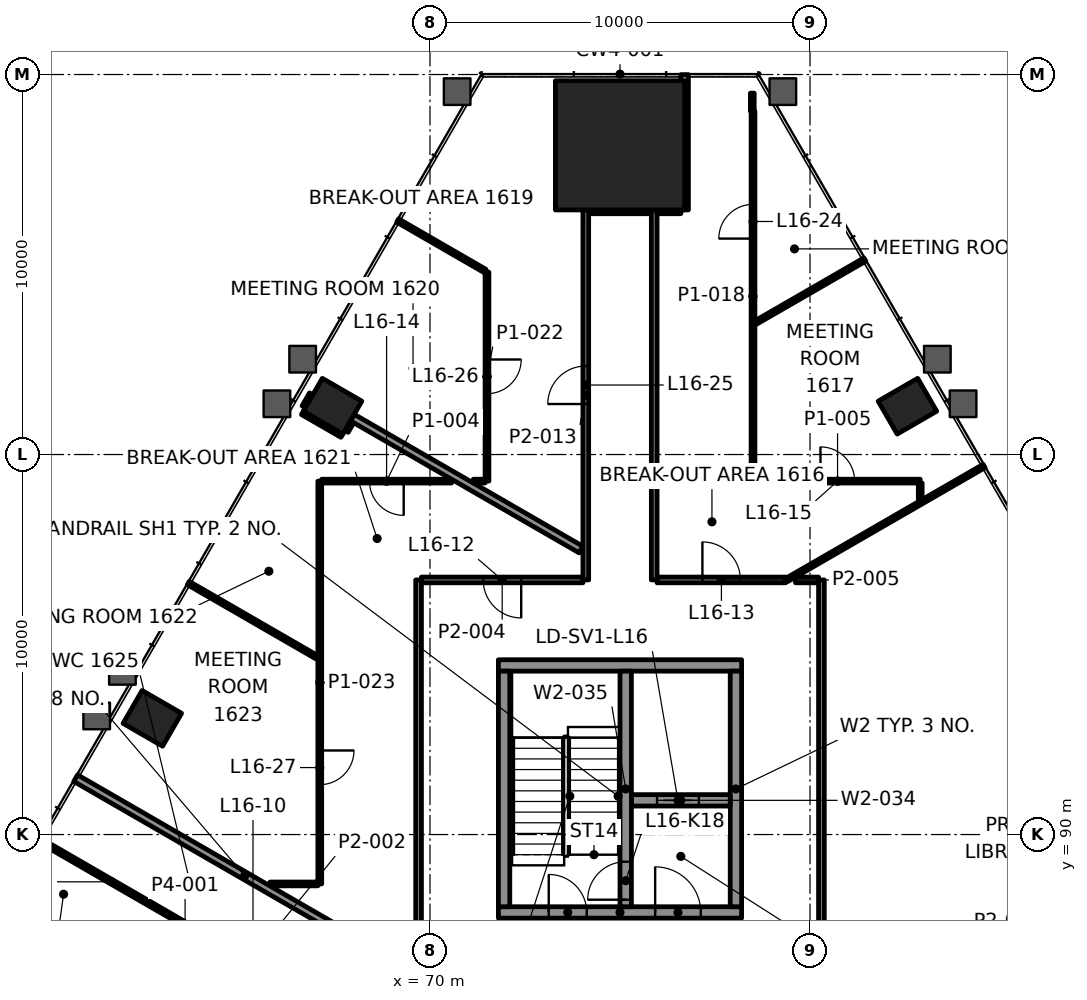
"""IFC4 building model, lengths in metres.
Left out: names, types, materials, properties, quantities, classifications, styles, units other than length and angle.
Written with IfcOpenShell. Run it as: python <this file> out.ifc"""

import sys

from ifc_helpers import new_model, si_unit, direction, frame, frame_2d, origin, origin_2d, place, context, subcontext, project, spatial, rectangle, extrude, element, fill, save


model = new_model("IFC4")
c1 = context("Model", 3, precision=1e-05, world=origin(), true_north=direction((0.0, 1.0)))
c2 = subcontext(c1, "Body", "Model", "MODEL_VIEW")
j1 = project(units=[si_unit("LENGTHUNIT", "METRE"), si_unit("PLANEANGLEUNIT", "RADIAN")], contexts=[c1])
p1 = place(None, origin())
s1 = spatial("IfcSite", under=j1, at=p1, CompositionType="ELEMENT")
p2 = place(p1, origin())
s2 = spatial("IfcBuilding", under=s1, at=p2, CompositionType="ELEMENT")
p3 = place(p2, frame((0.0, 0.0, 73.6)))
s3 = spatial("IfcBuildingStorey", under=s2, at=p3, CompositionType="ELEMENT", Elevation=73.6)
p4 = place(p3, frame((75.0, 108.136, 0.0), z_axis=(0.0, 0.0, 1.0), x_axis=(-1.0, 0.0, 0.0)))
e1 = element("IfcColumn", 1, at=p4, inside=s3, PredefinedType="COLUMN", context=c2, shape_type="SweptSolid", body=[
    extrude(rectangle(XDim=3.4, YDim=3.4, at=origin_2d()), origin(), (0.0, 0.0, 1.0), 4.2),
])
for number, where, z_axis, x_axis in (
    (2, (82.563, 101.272, -0.0), (0.0, 0.0, 1.0), (-0.5, 0.866, 0.0)),
    (3, (67.437, 101.272, -0.0), (0.0, 0.0, 1.0), (-0.5, -0.866, 0.0)),
    (4, (62.694, 93.057, -0.0), (0.0, 0.0, 1.0), (-0.5, -0.866, 0.0)),
):
    element("IfcColumn", number, at=place(p3, frame(where, z_axis=z_axis, x_axis=x_axis)), inside=s3, PredefinedType="COLUMN", context=c2, shape_type="SweptSolid", body=[
        extrude(rectangle(XDim=1.0, YDim=1.2, at=origin_2d()), origin(), (0.0, 0.0, 1.0), 4.2),
    ])
p5 = place(p3, frame((71.8, 87.95, 0.0), z_axis=(0.0, 0.0, 1.0), x_axis=(1.0, 0.0, 0.0)))
e5 = element("IfcWall", 5, at=p5, inside=s3, PredefinedType="SHEAR", context=c2, shape_type="SweptSolid", body=[
    extrude(rectangle(XDim=6.4, YDim=0.3, at=frame_2d((3.2, 0.0))), origin(), (0.0, 0.0, 1.0), 4.0),
])
p6 = place(p5, frame((1.325, 0.0, 0.0)))
e6 = element("IfcOpeningElement", 6, at=p6, cuts=e5, PredefinedType="OPENING", context=c2, shape_type="SweptSolid", body=[
    extrude(rectangle(XDim=1.0, YDim=2.1, at=frame_2d((0.5, 1.05))), frame((0.0, 0.16, 0.0), z_axis=(0.0, -1.0, 0.0), x_axis=(1.0, 0.0, 0.0)), (0.0, 0.0, 1.0), 0.32),
])
p7 = place(p5, frame((4.125, 0.0, 0.0)))
e7 = element("IfcOpeningElement", 7, at=p7, cuts=e5, PredefinedType="OPENING", context=c2, shape_type="SweptSolid", body=[
    extrude(rectangle(XDim=1.2, YDim=2.1, at=frame_2d((0.6, 1.05))), frame((0.0, 0.16, 0.0), z_axis=(0.0, -1.0, 0.0), x_axis=(1.0, 0.0, 0.0)), (0.0, 0.0, 1.0), 0.32),
])
p8 = place(p3, frame((71.8, 94.45, 0.0), z_axis=(0.0, 0.0, 1.0), x_axis=(1.0, 0.0, 0.0)))
e8 = element("IfcWall", 8, at=p8, inside=s3, PredefinedType="SHEAR", context=c2, shape_type="SweptSolid", body=[
    extrude(rectangle(XDim=6.4, YDim=0.3, at=frame_2d((3.2, 0.0))), origin(), (0.0, 0.0, 1.0), 4.0),
])
for number, where, z_axis, x_axis in (
    (9, (71.95, 88.1, 0.0), (0.0, 0.0, 1.0), (0.0, 1.0, 0.0)),
    (10, (78.05, 88.1, 0.0), (0.0, 0.0, 1.0), (0.0, 1.0, 0.0)),
):
    element("IfcWall", number, at=place(p3, frame(where, z_axis=z_axis, x_axis=x_axis)), inside=s3, PredefinedType="SHEAR", context=c2, shape_type="SweptSolid", body=[
        extrude(rectangle(XDim=6.2, YDim=0.3, at=frame_2d((3.1, 0.0))), origin(), (0.0, 0.0, 1.0), 4.0),
    ])
p9 = place(p3, frame((75.3, 90.9, 0.0), z_axis=(0.0, 0.0, 1.0), x_axis=(1.0, 0.0, 0.0)))
e11 = element("IfcWall", 11, at=p9, inside=s3, PredefinedType="SHEAR", context=c2, shape_type="SweptSolid", body=[
    extrude(rectangle(XDim=2.6, YDim=0.3, at=frame_2d((1.3, 0.0))), origin(), (0.0, 0.0, 1.0), 4.0),
])
p10 = place(p9, frame((0.675, 0.0, 0.0)))
e12 = element("IfcOpeningElement", 12, at=p10, cuts=e11, PredefinedType="OPENING", context=c2, shape_type="SweptSolid", body=[
    extrude(rectangle(XDim=1.1, YDim=2.1, at=frame_2d((0.55, 1.05))), frame((0.0, 0.16, 0.0), z_axis=(0.0, -1.0, 0.0), x_axis=(1.0, 0.0, 0.0)), (0.0, 0.0, 1.0), 0.32),
])
p11 = place(p3, frame((75.15, 88.1, 0.0), z_axis=(0.0, 0.0, 1.0), x_axis=(0.0, 1.0, 0.0)))
e13 = element("IfcWall", 13, at=p11, inside=s3, PredefinedType="SHEAR", context=c2, shape_type="SweptSolid", body=[
    extrude(rectangle(XDim=6.2, YDim=0.3, at=frame_2d((3.1, 0.0))), origin(), (0.0, 0.0, 1.0), 4.0),
])
p12 = place(p11, frame((0.185, 0.0, 0.0)))
e14 = element("IfcOpeningElement", 14, at=p12, cuts=e13, PredefinedType="OPENING", context=c2, shape_type="SweptSolid", body=[
    extrude(rectangle(XDim=1.0, YDim=2.1, at=frame_2d((0.5, 1.05))), frame((0.0, 0.16, 0.0), z_axis=(0.0, -1.0, 0.0), x_axis=(1.0, 0.0, 0.0)), (0.0, 0.0, 1.0), 0.32),
])
p13 = place(p3, frame((65.789, 88.7, 0.0), z_axis=(0.0, 0.0, 1.0), x_axis=(1.0, 0.0, 0.0)))
e15 = element("IfcWall", 15, at=p13, inside=s3, PredefinedType="PARTITIONING", context=c2, shape_type="SweptSolid", body=[
    extrude(rectangle(XDim=1.261, YDim=0.1, at=frame_2d((0.631, 0.0))), origin(), (0.0, 0.0, 1.0), 3.4),
])
p14 = place(p3, frame((74.025, 96.7, 0.0), z_axis=(0.0, 0.0, 1.0), x_axis=(-1.0, 0.0, 0.0)))
e16 = element("IfcWall", 16, at=p14, inside=s3, PredefinedType="PARTITIONING", context=c2, shape_type="SweptSolid", body=[
    extrude(rectangle(XDim=4.25, YDim=0.15, at=frame_2d((2.125, 0.0))), origin(), (0.0, 0.0, 1.0), 3.4),
])
p15 = place(p14, frame((1.625, 0.0, 0.0)))
e17 = element("IfcOpeningElement", 17, at=p15, cuts=e16, PredefinedType="OPENING", context=c2, shape_type="SweptSolid", body=[
    extrude(rectangle(XDim=1.0, YDim=2.1, at=frame_2d((0.5, 1.05))), frame((0.0, 0.085, 0.0), z_axis=(0.0, -1.0, 0.0), x_axis=(1.0, 0.0, 0.0)), (0.0, 0.0, 1.0), 0.17),
])
p16 = place(p3, frame((75.975, 96.7, 0.0), z_axis=(0.0, 0.0, 1.0), x_axis=(1.0, 0.0, 0.0)))
e18 = element("IfcWall", 18, at=p16, inside=s3, PredefinedType="PARTITIONING", context=c2, shape_type="SweptSolid", body=[
    extrude(rectangle(XDim=3.387, YDim=0.15, at=frame_2d((1.693, 0.0))), origin(), (0.0, 0.0, 1.0), 3.4),
])
p17 = place(p16, frame((1.194, 0.0, 0.0)))
e19 = element("IfcOpeningElement", 19, at=p17, cuts=e18, PredefinedType="OPENING", context=c2, shape_type="SweptSolid", body=[
    extrude(rectangle(XDim=1.0, YDim=2.1, at=frame_2d((0.5, 1.05))), frame((0.0, 0.085, 0.0), z_axis=(0.0, -1.0, 0.0), x_axis=(1.0, 0.0, 0.0)), (0.0, 0.0, 1.0), 0.17),
])
p18 = place(p3, frame((70.567, 99.3, 0.0), z_axis=(0.0, 0.0, 1.0), x_axis=(-1.0, 0.0, 0.0)))
e20 = element("IfcWall", 20, at=p18, inside=s3, PredefinedType="PARTITIONING", context=c2, shape_type="SweptSolid", body=[
    extrude(rectangle(XDim=3.417, YDim=0.1, at=frame_2d((1.708, 0.0))), origin(), (0.0, 0.0, 1.0), 3.4),
])
p19 = place(p18, frame((1.258, 0.0, 0.0)))
e21 = element("IfcOpeningElement", 21, at=p19, cuts=e20, PredefinedType="OPENING", context=c2, shape_type="SweptSolid", body=[
    extrude(rectangle(XDim=0.9, YDim=2.1, at=frame_2d((0.45, 1.05))), frame((0.0, 0.06, 0.0), z_axis=(0.0, -1.0, 0.0), x_axis=(1.0, 0.0, 0.0)), (0.0, 0.0, 1.0), 0.12),
])
p20 = place(p3, frame((78.55, 99.3, 0.0), z_axis=(0.0, 0.0, 1.0), x_axis=(1.0, 0.0, 0.0)))
e22 = element("IfcWall", 22, at=p20, inside=s3, PredefinedType="PARTITIONING", context=c2, shape_type="SweptSolid", body=[
    extrude(rectangle(XDim=4.349, YDim=0.1, at=frame_2d((2.175, 0.0))), origin(), (0.0, 0.0, 1.0), 3.4),
])
p21 = place(p20, frame((1.725, 0.0, 0.0)))
e23 = element("IfcOpeningElement", 23, at=p21, cuts=e22, PredefinedType="OPENING", context=c2, shape_type="SweptSolid", body=[
    extrude(rectangle(XDim=0.9, YDim=2.1, at=frame_2d((0.45, 1.05))), frame((0.0, 0.06, 0.0), z_axis=(0.0, -1.0, 0.0), x_axis=(1.0, 0.0, 0.0)), (0.0, 0.0, 1.0), 0.12),
])
p22 = place(p3, frame((74.176, 106.437, 0.0), z_axis=(0.0, 0.0, 1.0), x_axis=(1.0, 0.0, 0.0)))
e24 = element("IfcWall", 24, at=p22, inside=s3, PredefinedType="PARTITIONING", context=c2, shape_type="SweptSolid", body=[
    extrude(rectangle(XDim=1.649, YDim=0.2, at=frame_2d((0.825, 0.0))), origin(), (0.0, 0.0, 1.0), 3.397),
])
p23 = place(p3, frame((79.387, 96.7, 0.0), z_axis=(0.0, 0.0, 1.0), x_axis=(0.866032365835, 0.499987941182, 0.0)))
e25 = element("IfcWall", 25, at=p23, inside=s3, PredefinedType="PARTITIONING", context=c2, shape_type="SweptSolid", body=[
    extrude(rectangle(XDim=5.997, YDim=0.1, at=frame_2d((2.999, 0.0))), origin(), (0.0, 0.0, 1.0), 3.165),
])
p24 = place(p3, frame((78.576, 103.476, 0.0), z_axis=(0.0, 0.0, 1.0), x_axis=(0.866043162687, 0.499969239416, 0.0)))
e26 = element("IfcWall", 26, at=p24, inside=s3, PredefinedType="PARTITIONING", context=c2, shape_type="SweptSolid", body=[
    extrude(rectangle(XDim=3.311, YDim=0.1, at=frame_2d((1.656, 0.0))), origin(), (0.0, 0.0, 1.0), 3.4),
])
p25 = place(p3, frame((67.761, 100.634, 0.0), z_axis=(0.0, 0.0, 1.0), x_axis=(0.500305662732, 0.865848857387, 0.0)))
e27 = element("IfcWall", 27, at=p25, inside=s3, PredefinedType="PARTITIONING", context=c2, shape_type="SweptSolid", body=[
    extrude(rectangle(XDim=0.29, YDim=0.2, at=frame_2d((0.145, 0.0))), origin(), (0.0, 0.0, 1.0), 3.4),
])
p26 = place(p3, frame((66.721, 101.232, 0.0), z_axis=(0.0, 0.0, 1.0), x_axis=(0.500080938595, 0.865978668822, 0.0)))
e28 = element("IfcWall", 28, at=p26, inside=s3, PredefinedType="PARTITIONING", context=c2, shape_type="SweptSolid", body=[
    extrude(rectangle(XDim=0.393, YDim=0.2, at=frame_2d((0.197, 0.0))), origin(), (0.0, 0.0, 1.0), 3.4),
])
p27 = place(p3, frame((82.9, 98.816, 0.0), z_axis=(0.0, 0.0, 1.0), x_axis=(0.0, 1.0, 0.0)))
e29 = element("IfcWall", 29, at=p27, inside=s3, PredefinedType="PARTITIONING", context=c2, shape_type="SweptSolid", body=[
    extrude(rectangle(XDim=0.433, YDim=0.1, at=frame_2d((0.217, 0.0))), origin(), (0.0, 0.0, 1.0), 3.4),
])
p28 = place(p3, frame((80.3, 86.1, 0.0), z_axis=(0.0, 0.0, 1.0), x_axis=(0.0, 1.0, 0.0)))
e30 = element("IfcWall", 30, at=p28, inside=s3, PredefinedType="PARTITIONING", context=c2, shape_type="SweptSolid", body=[
    extrude(rectangle(XDim=10.599, YDim=0.15, at=frame_2d((5.3, 0.0))), origin(), (0.0, 0.0, 1.0), 3.4),
])
p29 = place(p3, frame((78.5, 99.3, 0.0), z_axis=(0.0, 0.0, 1.0), x_axis=(0.0, 1.0, 0.0)))
e31 = element("IfcWall", 31, at=p29, inside=s3, PredefinedType="PARTITIONING", context=c2, shape_type="SweptSolid", body=[
    extrude(rectangle(XDim=9.736, YDim=0.1, at=frame_2d((4.868, 0.0))), origin(), (0.0, 0.0, 1.0), 3.4),
])
p30 = place(p29, frame((6.382, 0.0, 0.0)))
e32 = element("IfcOpeningElement", 32, at=p30, cuts=e31, PredefinedType="OPENING", context=c2, shape_type="SweptSolid", body=[
    extrude(rectangle(XDim=0.9, YDim=2.1, at=frame_2d((0.45, 1.05))), frame((0.0, 0.06, 0.0), z_axis=(0.0, -1.0, 0.0), x_axis=(1.0, 0.0, 0.0)), (0.0, 0.0, 1.0), 0.12),
])
p31 = place(p3, frame((78.481, 109.037, 0.0), z_axis=(0.0, 0.0, 1.0), x_axis=(0.0, 1.0, 0.0)))
e33 = element("IfcWall", 33, at=p31, inside=s3, PredefinedType="PARTITIONING", context=c2, shape_type="SweptSolid", body=[
    extrude(rectangle(XDim=0.473, YDim=0.1, at=frame_2d((0.237, 0.0))), origin(), (0.0, 0.0, 1.0), 3.4),
])
p32 = place(p3, frame((76.7, 106.437, 0.0), z_axis=(0.0, 0.0, 1.0), x_axis=(0.0, 1.0, 0.0)))
e34 = element("IfcWall", 34, at=p32, inside=s3, PredefinedType="PARTITIONING", context=c2, shape_type="SweptSolid", body=[
    extrude(rectangle(XDim=3.56, YDim=0.2, at=frame_2d((1.78, 0.0))), origin(), (0.0, 0.0, 1.0), 3.4),
])
p33 = place(p3, frame((75.9, 96.7, 0.0), z_axis=(0.0, 0.0, 1.0), x_axis=(0.0, 1.0, 0.0)))
e35 = element("IfcWall", 35, at=p33, inside=s3, PredefinedType="PARTITIONING", context=c2, shape_type="SweptSolid", body=[
    extrude(rectangle(XDim=9.737, YDim=0.15, at=frame_2d((4.868, 0.0))), origin(), (0.0, 0.0, 1.0), 3.4),
])
p34 = place(p3, frame((74.1, 96.7, 0.0), z_axis=(0.0, 0.0, 1.0), x_axis=(0.0, 1.0, 0.0)))
e36 = element("IfcWall", 36, at=p34, inside=s3, PredefinedType="PARTITIONING", context=c2, shape_type="SweptSolid", body=[
    extrude(rectangle(XDim=9.736, YDim=0.15, at=frame_2d((4.868, 0.0))), origin(), (0.0, 0.0, 1.0), 3.4),
])
p35 = place(p34, frame((4.629, 0.0, 0.0)))
e37 = element("IfcOpeningElement", 37, at=p35, cuts=e36, PredefinedType="OPENING", context=c2, shape_type="SweptSolid", body=[
    extrude(rectangle(XDim=1.0, YDim=2.1, at=frame_2d((0.5, 1.05))), frame((0.0, 0.085, 0.0), z_axis=(0.0, -1.0, 0.0), x_axis=(1.0, 0.0, 0.0)), (0.0, 0.0, 1.0), 0.17),
])
p36 = place(p3, frame((71.5, 104.801, 0.0), z_axis=(0.0, 0.0, 1.0), x_axis=(0.0, -1.0, 0.0)))
e38 = element("IfcWall", 38, at=p36, inside=s3, PredefinedType="PARTITIONING", context=c2, shape_type="SweptSolid", body=[
    extrude(rectangle(XDim=5.501, YDim=0.1, at=frame_2d((2.75, 0.0))), origin(), (0.0, 0.0, 1.0), 3.4),
])
p37 = place(p36, frame((2.301, 0.0, 0.0)))
e39 = element("IfcOpeningElement", 39, at=p37, cuts=e38, PredefinedType="OPENING", context=c2, shape_type="SweptSolid", body=[
    extrude(rectangle(XDim=0.9, YDim=2.1, at=frame_2d((0.45, 1.05))), frame((0.0, 0.06, 0.0), z_axis=(0.0, -1.0, 0.0), x_axis=(1.0, 0.0, 0.0)), (0.0, 0.0, 1.0), 0.12),
])
p38 = place(p3, frame((69.7, 86.1, 0.0), z_axis=(0.0, 0.0, 1.0), x_axis=(0.0, 1.0, 0.0)))
e40 = element("IfcWall", 40, at=p38, inside=s3, PredefinedType="PARTITIONING", context=c2, shape_type="SweptSolid", body=[
    extrude(rectangle(XDim=10.6, YDim=0.15, at=frame_2d((5.3, 0.0))), origin(), (0.0, 0.0, 1.0), 3.4),
])
p39 = place(p3, frame((67.1, 99.3, 0.0), z_axis=(0.0, 0.0, 1.0), x_axis=(0.0, -1.0, 0.0)))
e41 = element("IfcWall", 41, at=p39, inside=s3, PredefinedType="PARTITIONING", context=c2, shape_type="SweptSolid", body=[
    extrude(rectangle(XDim=10.6, YDim=0.1, at=frame_2d((5.3, 0.0))), origin(), (0.0, 0.0, 1.0), 3.4),
])
p40 = place(p39, frame((7.088, 0.0, 0.0)))
e42 = element("IfcOpeningElement", 42, at=p40, cuts=e41, PredefinedType="OPENING", context=c2, shape_type="SweptSolid", body=[
    extrude(rectangle(XDim=0.9, YDim=2.1, at=frame_2d((0.45, 1.05))), frame((0.0, 0.06, 0.0), z_axis=(0.0, -1.0, 0.0), x_axis=(1.0, 0.0, 0.0)), (0.0, 0.0, 1.0), 0.12),
])
p41 = place(p3, frame((71.45, 104.83, 0.0), z_axis=(0.0, 0.0, 1.0), x_axis=(-0.866023371876, 0.500003519352, 0.0)))
e43 = element("IfcWall", 43, at=p41, inside=s3, PredefinedType="PARTITIONING", context=c2, shape_type="SweptSolid", body=[
    extrude(rectangle(XDim=2.657, YDim=0.1, at=frame_2d((1.328, 0.0))), origin(), (0.0, 0.0, 1.0), 3.4),
])
p42 = place(p3, frame((73.973, 97.499, 0.0), z_axis=(0.0, 0.0, 1.0), x_axis=(-0.866037536751, 0.499978984496, 0.0)))
e44 = element("IfcWall", 44, at=p42, inside=s3, PredefinedType="PARTITIONING", context=c2, shape_type="SweptSolid", body=[
    extrude(rectangle(XDim=6.948, YDim=0.2, at=frame_2d((3.474, 0.0))), origin(), (0.0, 0.0, 1.0), 3.4),
])
p43 = place(p3, frame((67.707, 100.539, 0.0), z_axis=(0.0, 0.0, 1.0), x_axis=(-0.865955154139, 0.50012165622, 0.0)))
e45 = element("IfcWall", 45, at=p43, inside=s3, PredefinedType="PARTITIONING", context=c2, shape_type="SweptSolid", body=[
    extrude(rectangle(XDim=1.2, YDim=0.2, at=frame_2d((0.6, 0.0))), origin(), (0.0, 0.0, 1.0), 3.165),
])
p44 = place(p3, frame((67.024, 94.665, 0.0), z_axis=(0.0, 0.0, 1.0), x_axis=(-0.866046116492, 0.499964122822, 0.0)))
e46 = element("IfcWall", 46, at=p44, inside=s3, PredefinedType="PARTITIONING", context=c2, shape_type="SweptSolid", body=[
    extrude(rectangle(XDim=3.906, YDim=0.1, at=frame_2d((1.953, 0.0))), origin(), (0.0, 0.0, 1.0), 3.165),
])
p45 = place(p3, frame((69.573, 86.348, 0.0), z_axis=(0.0, 0.0, 1.0), x_axis=(-0.866024495625, 0.500001572974, 0.0)))
e47 = element("IfcWall", 47, at=p45, inside=s3, PredefinedType="PARTITIONING", context=c2, shape_type="SweptSolid", body=[
    extrude(rectangle(XDim=10.272, YDim=0.2, at=frame_2d((5.136, 0.0))), origin(), (0.0, 0.0, 1.0), 3.165),
])
p46 = place(p3, frame((63.512, 87.665, 0.0), z_axis=(0.0, 0.0, 1.0), x_axis=(-0.866014185868, 0.500019429497, 0.0)))
e48 = element("IfcWall", 48, at=p46, inside=s3, PredefinedType="PARTITIONING", context=c2, shape_type="SweptSolid", body=[
    extrude(rectangle(XDim=4.365, YDim=0.12, at=frame_2d((2.182, 0.0))), origin(), (0.0, 0.0, 1.0), 3.165),
])
p47 = place(p3, frame((79.617, 96.7, 0.0), z_axis=(0.0, 0.0, 1.0), x_axis=(1.0, 0.0, 0.0)))
e49 = element("IfcWall", 49, at=p47, inside=s3, PredefinedType="PARTITIONING", context=c2, shape_type="SweptSolid", body=[
    extrude(rectangle(XDim=0.607, YDim=0.15, at=frame_2d((0.304, 0.0))), origin(), (0.0, 0.0, 1.0), 3.4),
])
p48 = place(p3, frame((71.14, 99.3, 0.0), z_axis=(0.0, 0.0, 1.0), x_axis=(1.0, 0.0, 0.0)))
e50 = element("IfcWall", 50, at=p48, inside=s3, PredefinedType="PARTITIONING", context=c2, shape_type="SweptSolid", body=[
    extrude(rectangle(XDim=0.31, YDim=0.1, at=frame_2d((0.155, 0.0))), origin(), (0.0, 0.0, 1.0), 3.4),
])
p49 = place(p3, frame((75.975, 106.437, 0.0), z_axis=(0.0, 0.0, 1.0), x_axis=(1.0, 0.0, 0.0)))
e51 = element("IfcWall", 51, at=p49, inside=s3, PredefinedType="PARTITIONING", context=c2, shape_type="SweptSolid", body=[
    extrude(rectangle(XDim=0.625, YDim=0.2, at=frame_2d((0.312, 0.0))), origin(), (0.0, 0.0, 1.0), 3.4),
])
p50 = place(p15, origin())
e52 = element("IfcDoor", 52, at=p50, inside=s3, OperationType="SINGLE_SWING_LEFT", PredefinedType="DOOR", context=c2, shape_type="SweptSolid", body=[
    extrude(rectangle(XDim=1.0, YDim=2.1, at=frame_2d((0.5, 1.05))), frame((0.0, 0.025, 0.0), z_axis=(0.0, -1.0, 0.0), x_axis=(1.0, 0.0, 0.0)), (0.0, 0.0, 1.0), 0.05),
])
fill(e17, e52)
p51 = place(p17, origin())
e53 = element("IfcDoor", 53, at=p51, inside=s3, OperationType="SINGLE_SWING_LEFT", PredefinedType="DOOR", context=c2, shape_type="SweptSolid", body=[
    extrude(rectangle(XDim=1.0, YDim=2.1, at=frame_2d((0.5, 1.05))), frame((0.0, 0.025, 0.0), z_axis=(0.0, -1.0, 0.0), x_axis=(1.0, 0.0, 0.0)), (0.0, 0.0, 1.0), 0.05),
])
fill(e19, e53)
p52 = place(p19, origin())
e54 = element("IfcDoor", 54, at=p52, inside=s3, OperationType="SINGLE_SWING_RIGHT", PredefinedType="DOOR", context=c2, shape_type="SweptSolid", body=[
    extrude(rectangle(XDim=0.9, YDim=2.1, at=frame_2d((0.45, 1.05))), frame((0.0, 0.025, 0.0), z_axis=(0.0, -1.0, 0.0), x_axis=(1.0, 0.0, 0.0)), (0.0, 0.0, 1.0), 0.05),
])
fill(e21, e54)
p53 = place(p21, origin())
e55 = element("IfcDoor", 55, at=p53, inside=s3, OperationType="SINGLE_SWING_RIGHT", PredefinedType="DOOR", context=c2, shape_type="SweptSolid", body=[
    extrude(rectangle(XDim=0.9, YDim=2.1, at=frame_2d((0.45, 1.05))), frame((0.0, 0.025, 0.0), z_axis=(0.0, -1.0, 0.0), x_axis=(1.0, 0.0, 0.0)), (0.0, 0.0, 1.0), 0.05),
])
fill(e23, e55)
p54 = place(p30, origin())
e56 = element("IfcDoor", 56, at=p54, inside=s3, OperationType="SINGLE_SWING_LEFT", PredefinedType="DOOR", context=c2, shape_type="SweptSolid", body=[
    extrude(rectangle(XDim=0.9, YDim=2.1, at=frame_2d((0.45, 1.05))), frame((0.0, 0.025, 0.0), z_axis=(0.0, -1.0, 0.0), x_axis=(1.0, 0.0, 0.0)), (0.0, 0.0, 1.0), 0.05),
])
fill(e32, e56)
p55 = place(p35, origin())
e57 = element("IfcDoor", 57, at=p55, inside=s3, OperationType="SINGLE_SWING_RIGHT", PredefinedType="DOOR", context=c2, shape_type="SweptSolid", body=[
    extrude(rectangle(XDim=1.0, YDim=2.1, at=frame_2d((0.5, 1.05))), frame((0.0, 0.025, 0.0), z_axis=(0.0, -1.0, 0.0), x_axis=(1.0, 0.0, 0.0)), (0.0, 0.0, 1.0), 0.05),
])
fill(e37, e57)
p56 = place(p37, origin())
e58 = element("IfcDoor", 58, at=p56, inside=s3, OperationType="SINGLE_SWING_RIGHT", PredefinedType="DOOR", context=c2, shape_type="SweptSolid", body=[
    extrude(rectangle(XDim=0.9, YDim=2.1, at=frame_2d((0.45, 1.05))), frame((0.0, 0.025, 0.0), z_axis=(0.0, -1.0, 0.0), x_axis=(1.0, 0.0, 0.0)), (0.0, 0.0, 1.0), 0.05),
])
fill(e39, e58)
p57 = place(p40, origin())
e59 = element("IfcDoor", 59, at=p57, inside=s3, OperationType="SINGLE_SWING_LEFT", PredefinedType="DOOR", context=c2, shape_type="SweptSolid", body=[
    extrude(rectangle(XDim=0.9, YDim=2.1, at=frame_2d((0.45, 1.05))), frame((0.0, 0.025, 0.0), z_axis=(0.0, -1.0, 0.0), x_axis=(1.0, 0.0, 0.0)), (0.0, 0.0, 1.0), 0.05),
])
fill(e42, e59)
p58 = place(p10, origin())
e60 = element("IfcDoor", 60, at=p58, inside=s3, OperationType="DOUBLE_DOOR_SLIDING", PredefinedType="DOOR", context=c2, shape_type="SweptSolid", body=[
    extrude(rectangle(XDim=1.1, YDim=2.1, at=frame_2d((0.55, 1.05))), frame((0.0, 0.025, 0.0), z_axis=(0.0, -1.0, 0.0), x_axis=(1.0, 0.0, 0.0)), (0.0, 0.0, 1.0), 0.05),
])
fill(e12, e60)
p59 = place(p6, origin())
e61 = element("IfcDoor", 61, at=p59, inside=s3, OperationType="SINGLE_SWING_RIGHT", PredefinedType="DOOR", context=c2, shape_type="SweptSolid", body=[
    extrude(rectangle(XDim=1.0, YDim=2.1, at=frame_2d((0.5, 1.05))), frame((0.0, 0.025, 0.0), z_axis=(0.0, -1.0, 0.0), x_axis=(1.0, 0.0, 0.0)), (0.0, 0.0, 1.0), 0.05),
])
fill(e6, e61)
p60 = place(p12, origin())
e62 = element("IfcDoor", 62, at=p60, inside=s3, OperationType="SINGLE_SWING_LEFT", PredefinedType="DOOR", context=c2, shape_type="SweptSolid", body=[
    extrude(rectangle(XDim=1.0, YDim=2.1, at=frame_2d((0.5, 1.05))), frame((0.0, 0.025, 0.0), z_axis=(0.0, -1.0, 0.0), x_axis=(1.0, 0.0, 0.0)), (0.0, 0.0, 1.0), 0.05),
])
fill(e14, e62)
p61 = place(p7, origin())
e63 = element("IfcDoor", 63, at=p61, inside=s3, OperationType="SINGLE_SWING_RIGHT", PredefinedType="DOOR", context=c2, shape_type="SweptSolid", body=[
    extrude(rectangle(XDim=1.2, YDim=2.1, at=frame_2d((0.6, 1.05))), frame((0.0, 0.025, 0.0), z_axis=(0.0, -1.0, 0.0), x_axis=(1.0, 0.0, 0.0)), (0.0, 0.0, 1.0), 0.05),
])
fill(e7, e63)
save(model, sys.argv[1])
